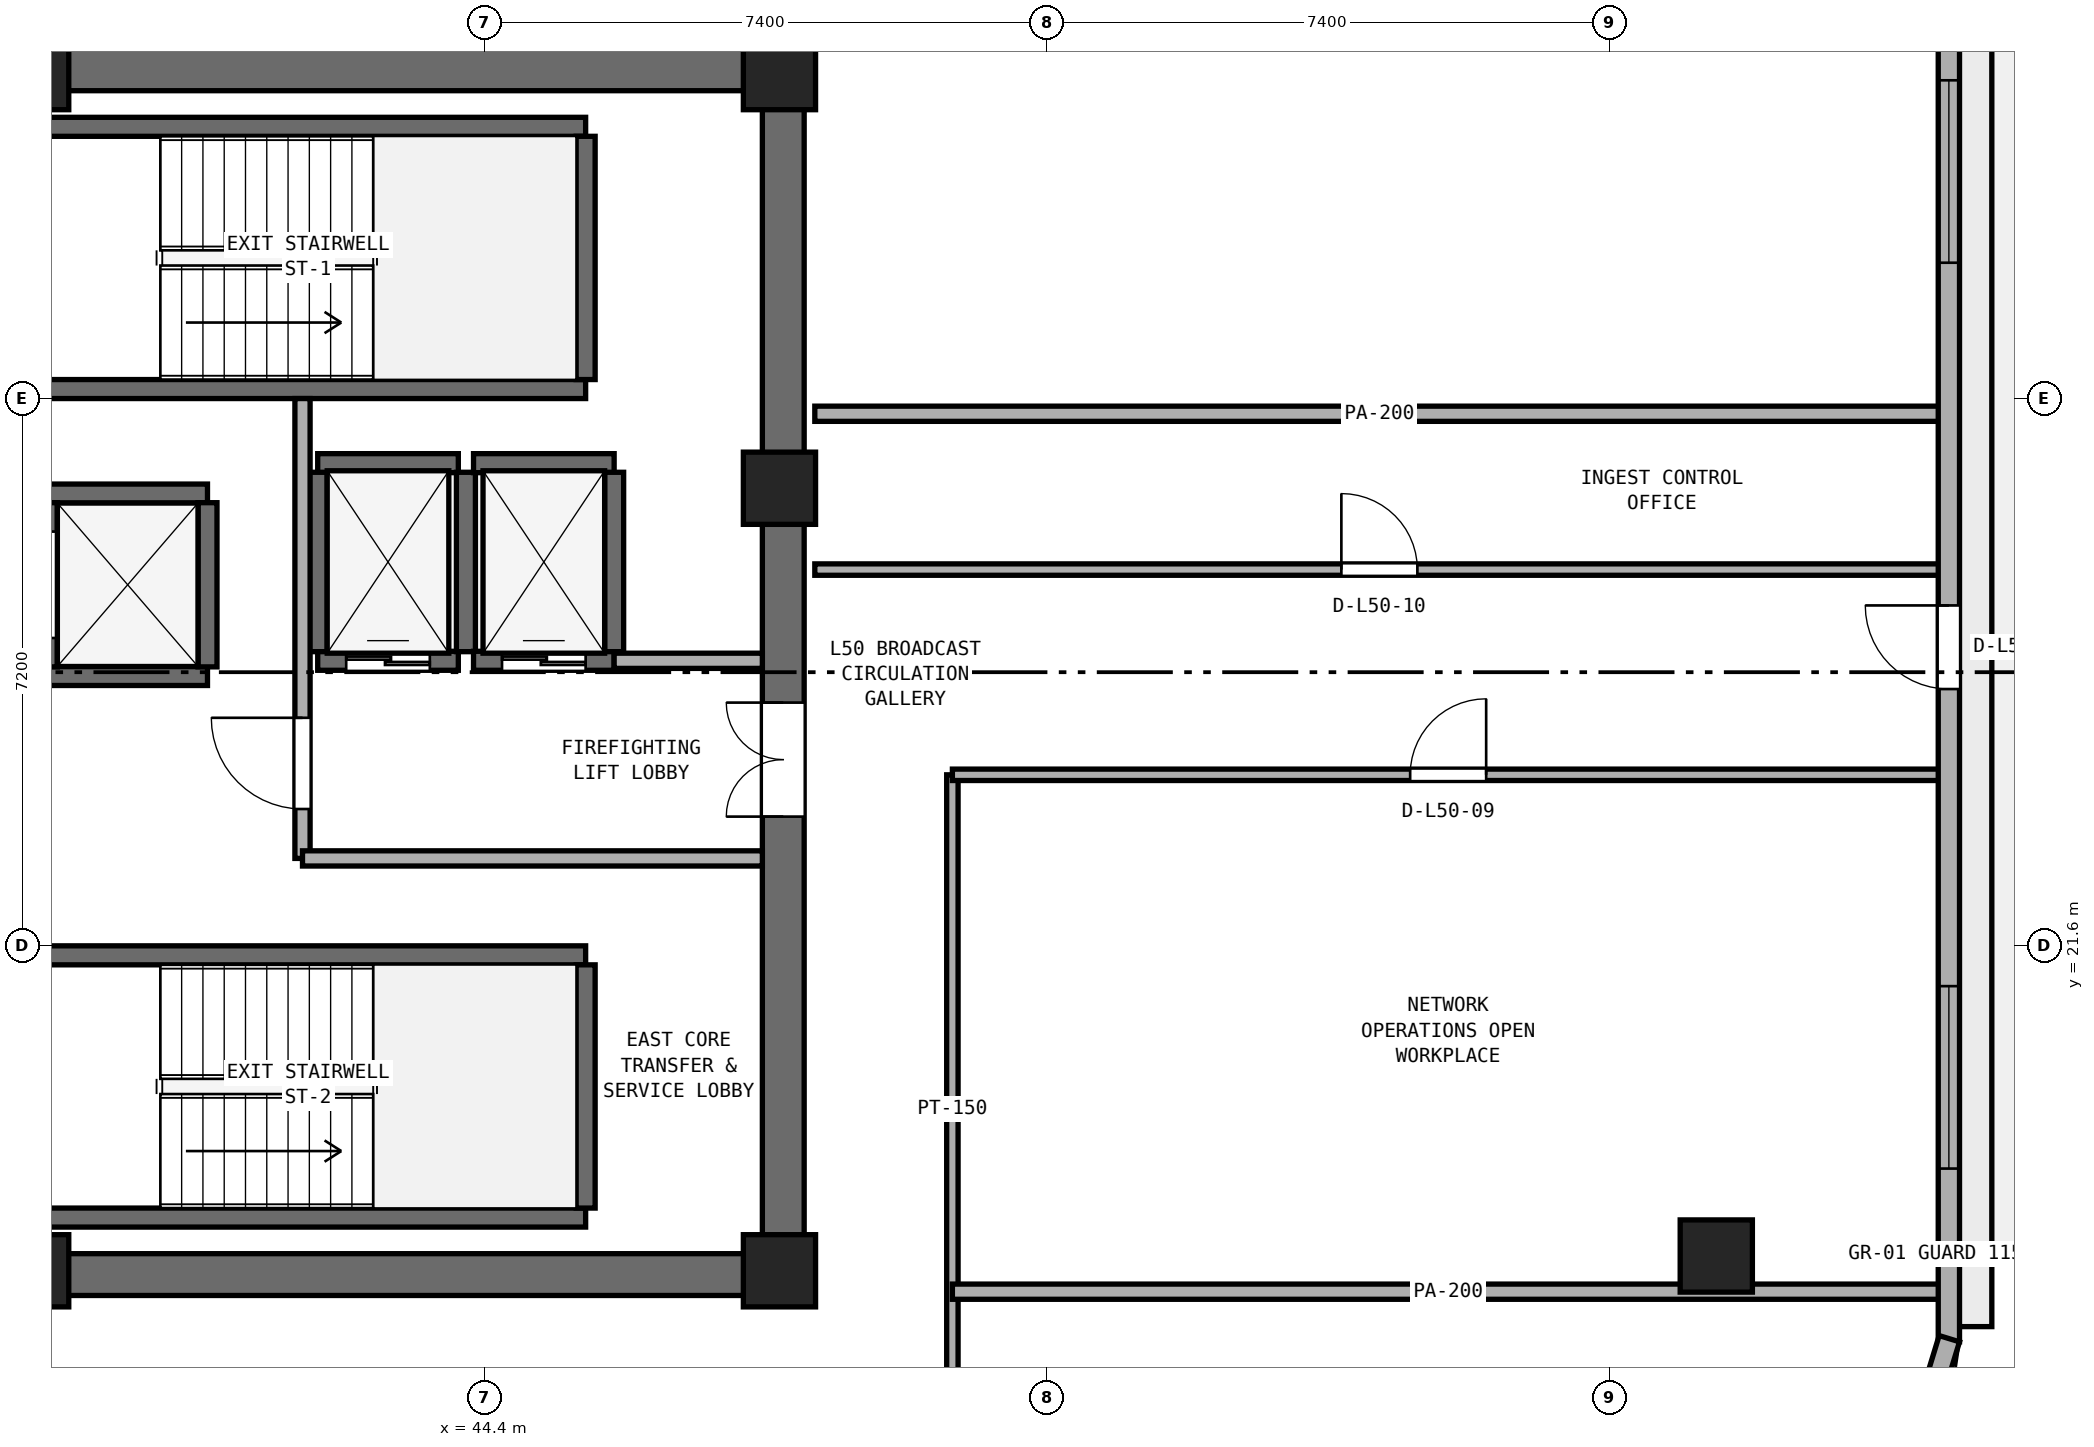
"""IFC4 building model, lengths in metres.
Left out: names, types, materials, properties, quantities, classifications, styles, units other than length and angle.
Written with IfcOpenShell. Run it as: python <this file> out.ifc"""

import sys

from ifc_helpers import new_model, si_unit, direction, frame, frame_2d, origin, origin_2d, place, context, subcontext, project, spatial, rectangle, extrude, element, fill, save


model = new_model("IFC4")
c1 = context("Model", 3, precision=1e-05, world=origin(), true_north=direction((0.0, 1.0)))
c2 = subcontext(c1, "Body", "Model", "MODEL_VIEW")
j1 = project(units=[si_unit("LENGTHUNIT", "METRE"), si_unit("PLANEANGLEUNIT", "RADIAN")], contexts=[c1])
p1 = place(None, origin())
s1 = spatial("IfcSite", under=j1, at=p1, CompositionType="ELEMENT")
p2 = place(p1, origin())
s2 = spatial("IfcBuilding", under=s1, at=p2, CompositionType="ELEMENT")
p3 = place(p2, frame((0.0, 0.0, 197.2)))
s3 = spatial("IfcBuildingStorey", under=s2, at=p3, CompositionType="ELEMENT", Elevation=197.2)
for number, where, z_axis, x_axis in (
    (1, (25.4, 17.275, 0.0), (0.0, 0.0, 1.0), (1.0, 0.0, 0.0)),
    (2, (25.4, 33.125, 0.0), (0.0, 0.0, 1.0), (1.0, 0.0, 0.0)),
):
    element("IfcWall", number, at=place(p3, frame(where, z_axis=z_axis, x_axis=x_axis)), inside=s3, PredefinedType="SHEAR", context=c2, shape_type="SweptSolid", body=[
        extrude(rectangle(XDim=23.2, YDim=0.55, at=frame_2d((11.6, 0.0))), origin(), (0.0, 0.0, 1.0), 3.54),
    ])
p4 = place(p3, frame((48.325, 17.55, 0.0), z_axis=(0.0, 0.0, 1.0), x_axis=(0.0, 1.0, 0.0)))
e3 = element("IfcWall", 3, at=p4, inside=s3, PredefinedType="SHEAR", context=c2, shape_type="SweptSolid", body=[
    extrude(rectangle(XDim=15.3, YDim=0.55, at=frame_2d((7.65, 0.0))), origin(), (0.0, 0.0, 1.0), 3.54),
])
p5 = place(p4, frame((5.75, 0.0, 0.0)))
e4 = element("IfcOpeningElement", 4, at=p5, cuts=e3, PredefinedType="OPENING", context=c2, shape_type="SweptSolid", body=[
    extrude(rectangle(XDim=1.5, YDim=2.15, at=frame_2d((0.75, 1.075))), frame((0.0, 0.285, 0.0), z_axis=(0.0, -1.0, 0.0), x_axis=(1.0, 0.0, 0.0)), (0.0, 0.0, 1.0), 0.57),
])
for number, where, z_axis, x_axis in (
    (5, (38.45, 17.325, 0.0), (0.0, 0.0, 1.0), (1.0, 0.0, 0.0)),
    (6, (48.275, 17.325, 0.0), (0.0, 0.0, 1.0), (1.0, 0.0, 0.0)),
    (7, (48.275, 27.62, 0.0), (0.0, 0.0, 1.0), (1.0, 0.0, 0.0)),
    (8, (48.275, 33.075, 0.0), (0.0, 0.0, 1.0), (1.0, 0.0, 0.0)),
    (9, (38.45, 33.075, 0.0), (0.0, 0.0, 1.0), (1.0, 0.0, 0.0)),
):
    element("IfcColumn", number, at=place(p3, frame(where, z_axis=z_axis, x_axis=x_axis)), inside=s3, PredefinedType="PILASTER", context=c2, shape_type="SweptSolid", body=[
        extrude(rectangle(XDim=0.95, YDim=0.95, at=origin_2d()), origin(), (0.0, 0.0, 1.0), 3.8),
    ])
p6 = place(p3, frame((60.6, 17.519, 0.0), z_axis=(0.0, 0.0, 1.0), x_axis=(1.0, 0.0, 0.0)))
e10 = element("IfcColumn", 10, at=p6, inside=s3, PredefinedType="COLUMN", context=c2, shape_type="SweptSolid", body=[
    extrude(rectangle(XDim=0.95, YDim=0.95, at=origin_2d()), origin(), (0.0, 0.0, 1.0), 3.8),
])
for number, where, z_axis, x_axis in (
    (11, (38.425, 28.925, 0.0), (0.0, 0.0, 1.0), (1.0, 0.0, 0.0)),
    (12, (38.425, 32.375, 0.0), (0.0, 0.0, 1.0), (1.0, 0.0, 0.0)),
):
    element("IfcWall", number, at=place(p3, frame(where, z_axis=z_axis, x_axis=x_axis)), inside=s3, PredefinedType="SHEAR", context=c2, shape_type="SweptSolid", body=[
        extrude(rectangle(XDim=7.3, YDim=0.25, at=frame_2d((3.65, 0.0))), origin(), (0.0, 0.0, 1.0), 3.54),
    ])
p7 = place(p3, frame((45.725, 29.05, 0.0), z_axis=(0.0, 0.0, 1.0), x_axis=(0.0, 1.0, 0.0)))
e13 = element("IfcWall", 13, at=p7, inside=s3, PredefinedType="SHEAR", context=c2, shape_type="SweptSolid", body=[
    extrude(rectangle(XDim=3.2, YDim=0.25, at=frame_2d((1.6, 0.0))), origin(), (0.0, 0.0, 1.0), 3.54),
])
for number, where, z_axis, x_axis in (
    (14, (38.425, 18.025, 0.0), (0.0, 0.0, 1.0), (1.0, 0.0, 0.0)),
    (15, (38.425, 21.475, 0.0), (0.0, 0.0, 1.0), (1.0, 0.0, 0.0)),
):
    element("IfcWall", number, at=place(p3, frame(where, z_axis=z_axis, x_axis=x_axis)), inside=s3, PredefinedType="SHEAR", context=c2, shape_type="SweptSolid", body=[
        extrude(rectangle(XDim=7.3, YDim=0.25, at=frame_2d((3.65, 0.0))), origin(), (0.0, 0.0, 1.0), 3.54),
    ])
p8 = place(p3, frame((45.725, 18.15, 0.0), z_axis=(0.0, 0.0, 1.0), x_axis=(0.0, 1.0, 0.0)))
e16 = element("IfcWall", 16, at=p8, inside=s3, PredefinedType="SHEAR", context=c2, shape_type="SweptSolid", body=[
    extrude(rectangle(XDim=3.2, YDim=0.25, at=frame_2d((1.6, 0.0))), origin(), (0.0, 0.0, 1.0), 3.54),
])
p9 = place(p3, frame((42.2, 25.35, 0.0), z_axis=(0.0, 0.0, 1.0), x_axis=(1.0, 0.0, 0.0)))
e17 = element("IfcWall", 17, at=p9, inside=s3, PredefinedType="SHEAR", context=c2, shape_type="SweptSolid", body=[
    extrude(rectangle(XDim=1.85, YDim=0.25, at=frame_2d((0.925, 0.0))), origin(), (0.0, 0.0, 1.0), 3.54),
])
p10 = place(p9, frame((0.375, 0.0, 0.0)))
e18 = element("IfcOpeningElement", 18, at=p10, cuts=e17, PredefinedType="OPENING", context=c2, shape_type="SweptSolid", body=[
    extrude(rectangle(XDim=1.1, YDim=2.15, at=frame_2d((0.55, 1.075))), frame((0.0, 0.135, 0.0), z_axis=(0.0, -1.0, 0.0), x_axis=(1.0, 0.0, 0.0)), (0.0, 0.0, 1.0), 0.27),
])
p11 = place(p3, frame((42.2, 27.95, 0.0), z_axis=(0.0, 0.0, 1.0), x_axis=(1.0, 0.0, 0.0)))
e19 = element("IfcWall", 19, at=p11, inside=s3, PredefinedType="SHEAR", context=c2, shape_type="SweptSolid", body=[
    extrude(rectangle(XDim=1.85, YDim=0.25, at=frame_2d((0.925, 0.0))), origin(), (0.0, 0.0, 1.0), 3.54),
])
for number, where, z_axis, x_axis in (
    (20, (42.2, 25.47, 0.0), (0.0, 0.0, 1.0), (0.0, 1.0, 0.0)),
    (21, (44.15, 25.47, 0.0), (0.0, 0.0, 1.0), (0.0, 1.0, 0.0)),
):
    element("IfcWall", number, at=place(p3, frame(where, z_axis=z_axis, x_axis=x_axis)), inside=s3, PredefinedType="SHEAR", context=c2, shape_type="SweptSolid", body=[
        extrude(rectangle(XDim=2.36, YDim=0.25, at=frame_2d((1.18, 0.0))), origin(), (0.0, 0.0, 1.0), 3.54),
    ])
p12 = place(p3, frame((44.25, 25.35, 0.0), z_axis=(0.0, 0.0, 1.0), x_axis=(1.0, 0.0, 0.0)))
e22 = element("IfcWall", 22, at=p12, inside=s3, PredefinedType="SHEAR", context=c2, shape_type="SweptSolid", body=[
    extrude(rectangle(XDim=1.85, YDim=0.25, at=frame_2d((0.925, 0.0))), origin(), (0.0, 0.0, 1.0), 3.54),
])
p13 = place(p12, frame((0.375, 0.0, 0.0)))
e23 = element("IfcOpeningElement", 23, at=p13, cuts=e22, PredefinedType="OPENING", context=c2, shape_type="SweptSolid", body=[
    extrude(rectangle(XDim=1.1, YDim=2.15, at=frame_2d((0.55, 1.075))), frame((0.0, 0.135, 0.0), z_axis=(0.0, -1.0, 0.0), x_axis=(1.0, 0.0, 0.0)), (0.0, 0.0, 1.0), 0.27),
])
p14 = place(p3, frame((44.25, 27.95, 0.0), z_axis=(0.0, 0.0, 1.0), x_axis=(1.0, 0.0, 0.0)))
e24 = element("IfcWall", 24, at=p14, inside=s3, PredefinedType="SHEAR", context=c2, shape_type="SweptSolid", body=[
    extrude(rectangle(XDim=1.85, YDim=0.25, at=frame_2d((0.925, 0.0))), origin(), (0.0, 0.0, 1.0), 3.54),
])
p15 = place(p3, frame((46.1, 25.47, 0.0), z_axis=(0.0, 0.0, 1.0), x_axis=(0.0, 1.0, 0.0)))
e25 = element("IfcWall", 25, at=p15, inside=s3, PredefinedType="SHEAR", context=c2, shape_type="SweptSolid", body=[
    extrude(rectangle(XDim=2.36, YDim=0.25, at=frame_2d((1.18, 0.0))), origin(), (0.0, 0.0, 1.0), 3.54),
])
for number, where, z_axis, x_axis in (
    (26, (38.65, 25.15, 0.0), (0.0, 0.0, 1.0), (1.0, 0.0, 0.0)),
    (27, (38.65, 27.55, 0.0), (0.0, 0.0, 1.0), (1.0, 0.0, 0.0)),
):
    element("IfcWall", number, at=place(p3, frame(where, z_axis=z_axis, x_axis=x_axis)), inside=s3, PredefinedType="SHEAR", context=c2, shape_type="SweptSolid", body=[
        extrude(rectangle(XDim=2.1, YDim=0.25, at=frame_2d((1.05, 0.0))), origin(), (0.0, 0.0, 1.0), 3.54),
    ])
p16 = place(p3, frame((38.65, 25.27, 0.0), z_axis=(0.0, 0.0, 1.0), x_axis=(0.0, 1.0, 0.0)))
e28 = element("IfcWall", 28, at=p16, inside=s3, PredefinedType="SHEAR", context=c2, shape_type="SweptSolid", body=[
    extrude(rectangle(XDim=2.16, YDim=0.25, at=frame_2d((1.08, 0.0))), origin(), (0.0, 0.0, 1.0), 3.54),
])
p17 = place(p16, frame((0.38, 0.0, 0.0)))
e29 = element("IfcOpeningElement", 29, at=p17, cuts=e28, PredefinedType="OPENING", context=c2, shape_type="SweptSolid", body=[
    extrude(rectangle(XDim=1.4, YDim=2.2, at=frame_2d((0.7, 1.1))), frame((0.0, 0.135, 0.0), z_axis=(0.0, -1.0, 0.0), x_axis=(1.0, 0.0, 0.0)), (0.0, 0.0, 1.0), 0.27),
])
p18 = place(p3, frame((40.75, 25.27, 0.0), z_axis=(0.0, 0.0, 1.0), x_axis=(0.0, 1.0, 0.0)))
e30 = element("IfcWall", 30, at=p18, inside=s3, PredefinedType="SHEAR", context=c2, shape_type="SweptSolid", body=[
    extrude(rectangle(XDim=2.16, YDim=0.25, at=frame_2d((1.08, 0.0))), origin(), (0.0, 0.0, 1.0), 3.54),
])
p19 = place(p3, frame((42.0, 22.75, 0.0), z_axis=(0.0, 0.0, 1.0), x_axis=(0.0, 1.0, 0.0)))
e31 = element("IfcWall", 31, at=p19, inside=s3, PredefinedType="SOLIDWALL", context=c2, shape_type="SweptSolid", body=[
    extrude(rectangle(XDim=6.05, YDim=0.2, at=frame_2d((3.025, 0.0))), origin(), (0.0, 0.0, 1.0), 3.54),
])
p20 = place(p19, frame((0.65, 0.0, 0.0)))
e32 = element("IfcOpeningElement", 32, at=p20, cuts=e31, PredefinedType="OPENING", context=c2, shape_type="SweptSolid", body=[
    extrude(rectangle(XDim=1.2, YDim=2.15, at=frame_2d((0.6, 1.075))), frame((0.0, 0.11, 0.0), z_axis=(0.0, -1.0, 0.0), x_axis=(1.0, 0.0, 0.0)), (0.0, 0.0, 1.0), 0.22),
])
p21 = place(p3, frame((42.0, 22.75, 0.0), z_axis=(0.0, 0.0, 1.0), x_axis=(1.0, 0.0, 0.0)))
e33 = element("IfcWall", 33, at=p21, inside=s3, PredefinedType="SOLIDWALL", context=c2, shape_type="SweptSolid", body=[
    extrude(rectangle(XDim=6.05, YDim=0.2, at=frame_2d((3.025, 0.0))), origin(), (0.0, 0.0, 1.0), 3.54),
])
p22 = place(p3, frame((46.1, 25.35, 0.0), z_axis=(0.0, 0.0, 1.0), x_axis=(1.0, 0.0, 0.0)))
e34 = element("IfcWall", 34, at=p22, inside=s3, PredefinedType="SOLIDWALL", context=c2, shape_type="SweptSolid", body=[
    extrude(rectangle(XDim=1.95, YDim=0.2, at=frame_2d((0.975, 0.0))), origin(), (0.0, 0.0, 1.0), 3.54),
])
p23 = place(p3, frame((50.55, 15.05, 0.0), z_axis=(0.0, 0.0, 1.0), x_axis=(0.0, 1.0, 0.0)))
e35 = element("IfcWall", 35, at=p23, inside=s3, PredefinedType="PARTITIONING", context=c2, shape_type="SweptSolid", body=[
    extrude(rectangle(XDim=8.8, YDim=0.15, at=frame_2d((4.4, 0.0))), origin(), (0.0, 0.0, 1.0), 3.54),
])
p24 = place(p3, frame((50.55, 17.05, 0.0), z_axis=(0.0, 0.0, 1.0), x_axis=(1.0, 0.0, 0.0)))
e36 = element("IfcWall", 36, at=p24, inside=s3, PredefinedType="PARTITIONING", context=c2, shape_type="SweptSolid", body=[
    extrude(rectangle(XDim=13.045, YDim=0.2, at=frame_2d((6.522, 0.0))), origin(), (0.0, 0.0, 1.0), 2.79),
])
p25 = place(p3, frame((50.55, 23.85, 0.0), z_axis=(0.0, 0.0, 1.0), x_axis=(1.0, 0.0, 0.0)))
e37 = element("IfcWall", 37, at=p25, inside=s3, PredefinedType="PARTITIONING", context=c2, shape_type="SweptSolid", body=[
    extrude(rectangle(XDim=13.045, YDim=0.15, at=frame_2d((6.522, 0.0))), origin(), (0.0, 0.0, 1.0), 3.54),
])
p26 = place(p25, frame((6.022, 0.0, 0.0)))
e38 = element("IfcOpeningElement", 38, at=p26, cuts=e37, PredefinedType="OPENING", context=c2, shape_type="SweptSolid", body=[
    extrude(rectangle(XDim=1.0, YDim=2.12, at=frame_2d((0.5, 1.06))), frame((0.0, 0.085, 0.0), z_axis=(0.0, -1.0, 0.0), x_axis=(1.0, 0.0, 0.0)), (0.0, 0.0, 1.0), 0.17),
])
p27 = place(p3, frame((48.74, 26.55, 0.0), z_axis=(0.0, 0.0, 1.0), x_axis=(1.0, 0.0, 0.0)))
e39 = element("IfcWall", 39, at=p27, inside=s3, PredefinedType="PARTITIONING", context=c2, shape_type="SweptSolid", body=[
    extrude(rectangle(XDim=14.855, YDim=0.15, at=frame_2d((7.427, 0.0))), origin(), (0.0, 0.0, 1.0), 3.54),
])
p28 = place(p27, frame((6.927, 0.0, 0.0)))
e40 = element("IfcOpeningElement", 40, at=p28, cuts=e39, PredefinedType="OPENING", context=c2, shape_type="SweptSolid", body=[
    extrude(rectangle(XDim=1.0, YDim=2.12, at=frame_2d((0.5, 1.06))), frame((0.0, 0.085, 0.0), z_axis=(0.0, -1.0, 0.0), x_axis=(1.0, 0.0, 0.0)), (0.0, 0.0, 1.0), 0.17),
])
p29 = place(p3, frame((48.74, 28.6, 0.0), z_axis=(0.0, 0.0, 1.0), x_axis=(1.0, 0.0, 0.0)))
e41 = element("IfcWall", 41, at=p29, inside=s3, PredefinedType="PARTITIONING", context=c2, shape_type="SweptSolid", body=[
    extrude(rectangle(XDim=14.855, YDim=0.2, at=frame_2d((7.427, 0.0))), origin(), (0.0, 0.0, 1.0), 3.54),
])
p30 = place(p3, frame((63.66, 16.39, 0.0), z_axis=(0.0, 0.0, 1.0), x_axis=(0.0, 1.0, 0.0)))
e42 = element("IfcWall", 42, at=p30, inside=s3, PredefinedType="STANDARD", context=c2, shape_type="SweptSolid", body=[
    extrude(rectangle(XDim=18.876, YDim=0.28, at=frame_2d((9.438, 0.0))), origin(), (0.0, 0.0, 1.0), 3.54),
])
p31 = place(p30, frame((8.588, 0.0, 0.0)))
e43 = element("IfcOpeningElement", 43, at=p31, cuts=e42, PredefinedType="OPENING", context=c2, shape_type="SweptSolid", body=[
    extrude(rectangle(XDim=1.1, YDim=2.2, at=frame_2d((0.55, 1.1))), frame((0.0, 0.15, 0.0), z_axis=(0.0, -1.0, 0.0), x_axis=(1.0, 0.0, 0.0)), (0.0, 0.0, 1.0), 0.3),
])
p32 = place(p30, frame((2.279, 0.0, 0.9)))
e44 = element("IfcOpeningElement", 44, at=p32, cuts=e42, PredefinedType="OPENING", context=c2, shape_type="SweptSolid", body=[
    extrude(rectangle(XDim=2.4, YDim=1.75, at=frame_2d((1.2, 0.875))), frame((0.0, 0.15, 0.0), z_axis=(0.0, -1.0, 0.0), x_axis=(1.0, 0.0, 0.0)), (0.0, 0.0, 1.0), 0.3),
])
p33 = place(p30, frame((14.197, 0.0, 0.9)))
e45 = element("IfcOpeningElement", 45, at=p33, cuts=e42, PredefinedType="OPENING", context=c2, shape_type="SweptSolid", body=[
    extrude(rectangle(XDim=2.4, YDim=1.75, at=frame_2d((1.2, 0.875))), frame((0.0, 0.15, 0.0), z_axis=(0.0, -1.0, 0.0), x_axis=(1.0, 0.0, 0.0)), (0.0, 0.0, 1.0), 0.3),
])
p34 = place(p3, frame((62.982, 14.194, 0.0), z_axis=(0.0, 0.0, 1.0), x_axis=(0.292398811023, 0.956296468315, 0.0)))
e46 = element("IfcWall", 46, at=p34, inside=s3, PredefinedType="STANDARD", context=c2, shape_type="SweptSolid", body=[
    extrude(rectangle(XDim=2.34, YDim=0.28, at=frame_2d((1.17, 0.0))), origin(), (0.0, 0.0, 1.0), 3.54),
])
p35 = place(p10, origin())
e47 = element("IfcDoor", 47, at=p35, inside=s3, OperationType="DOUBLE_DOOR_SLIDING", PredefinedType="DOOR", context=c2, shape_type="SweptSolid", body=[
    extrude(rectangle(XDim=1.1, YDim=2.15, at=frame_2d((0.55, 1.075))), frame((0.0, 0.025, 0.0), z_axis=(0.0, -1.0, 0.0), x_axis=(1.0, 0.0, 0.0)), (0.0, 0.0, 1.0), 0.05),
])
fill(e18, e47)
p36 = place(p13, origin())
e48 = element("IfcDoor", 48, at=p36, inside=s3, OperationType="DOUBLE_DOOR_SLIDING", PredefinedType="DOOR", context=c2, shape_type="SweptSolid", body=[
    extrude(rectangle(XDim=1.1, YDim=2.15, at=frame_2d((0.55, 1.075))), frame((0.0, 0.025, 0.0), z_axis=(0.0, -1.0, 0.0), x_axis=(1.0, 0.0, 0.0)), (0.0, 0.0, 1.0), 0.05),
])
fill(e23, e48)
p37 = place(p20, origin())
e49 = element("IfcDoor", 49, at=p37, inside=s3, OperationType="SINGLE_SWING_RIGHT", PredefinedType="DOOR", context=c2, shape_type="SweptSolid", body=[
    extrude(rectangle(XDim=1.2, YDim=2.15, at=frame_2d((0.6, 1.075))), frame((0.0, 0.025, 0.0), z_axis=(0.0, -1.0, 0.0), x_axis=(1.0, 0.0, 0.0)), (0.0, 0.0, 1.0), 0.05),
])
fill(e32, e49)
p38 = place(p5, origin())
e50 = element("IfcDoor", 50, at=p38, inside=s3, OperationType="DOUBLE_DOOR_SINGLE_SWING", PredefinedType="DOOR", context=c2, shape_type="SweptSolid", body=[
    extrude(rectangle(XDim=1.5, YDim=2.15, at=frame_2d((0.75, 1.075))), frame((0.0, 0.025, 0.0), z_axis=(0.0, -1.0, 0.0), x_axis=(1.0, 0.0, 0.0)), (0.0, 0.0, 1.0), 0.05),
])
fill(e4, e50)
p39 = place(p26, origin())
e51 = element("IfcDoor", 51, at=p39, inside=s3, OperationType="SINGLE_SWING_RIGHT", PredefinedType="DOOR", context=c2, shape_type="SweptSolid", body=[
    extrude(rectangle(XDim=1.0, YDim=2.12, at=frame_2d((0.5, 1.06))), frame((0.0, 0.025, 0.0), z_axis=(0.0, -1.0, 0.0), x_axis=(1.0, 0.0, 0.0)), (0.0, 0.0, 1.0), 0.05),
])
fill(e38, e51)
p40 = place(p28, origin())
e52 = element("IfcDoor", 52, at=p40, inside=s3, OperationType="SINGLE_SWING_LEFT", PredefinedType="DOOR", context=c2, shape_type="SweptSolid", body=[
    extrude(rectangle(XDim=1.0, YDim=2.12, at=frame_2d((0.5, 1.06))), frame((0.0, 0.025, 0.0), z_axis=(0.0, -1.0, 0.0), x_axis=(1.0, 0.0, 0.0)), (0.0, 0.0, 1.0), 0.05),
])
fill(e40, e52)
p41 = place(p31, origin())
e53 = element("IfcDoor", 53, at=p41, inside=s3, OperationType="SINGLE_SWING_RIGHT", PredefinedType="DOOR", context=c2, shape_type="SweptSolid", body=[
    extrude(rectangle(XDim=1.1, YDim=2.2, at=frame_2d((0.55, 1.1))), frame((0.0, 0.025, 0.0), z_axis=(0.0, -1.0, 0.0), x_axis=(1.0, 0.0, 0.0)), (0.0, 0.0, 1.0), 0.05),
])
fill(e43, e53)
p42 = place(p32, origin())
e54 = element("IfcWindow", 54, at=p42, inside=s3, PartitioningType="SINGLE_PANEL", PredefinedType="WINDOW", context=c2, shape_type="SweptSolid", body=[
    extrude(rectangle(XDim=2.4, YDim=1.75, at=frame_2d((1.2, 0.875))), frame((0.0, 0.03, 0.0), z_axis=(0.0, -1.0, 0.0), x_axis=(1.0, 0.0, 0.0)), (0.0, 0.0, 1.0), 0.06),
])
fill(e44, e54)
p43 = place(p33, origin())
e55 = element("IfcWindow", 55, at=p43, inside=s3, PartitioningType="SINGLE_PANEL", PredefinedType="WINDOW", context=c2, shape_type="SweptSolid", body=[
    extrude(rectangle(XDim=2.4, YDim=1.75, at=frame_2d((1.2, 0.875))), frame((0.0, 0.03, 0.0), z_axis=(0.0, -1.0, 0.0), x_axis=(1.0, 0.0, 0.0)), (0.0, 0.0, 1.0), 0.06),
])
fill(e45, e55)
save(model, sys.argv[1])
